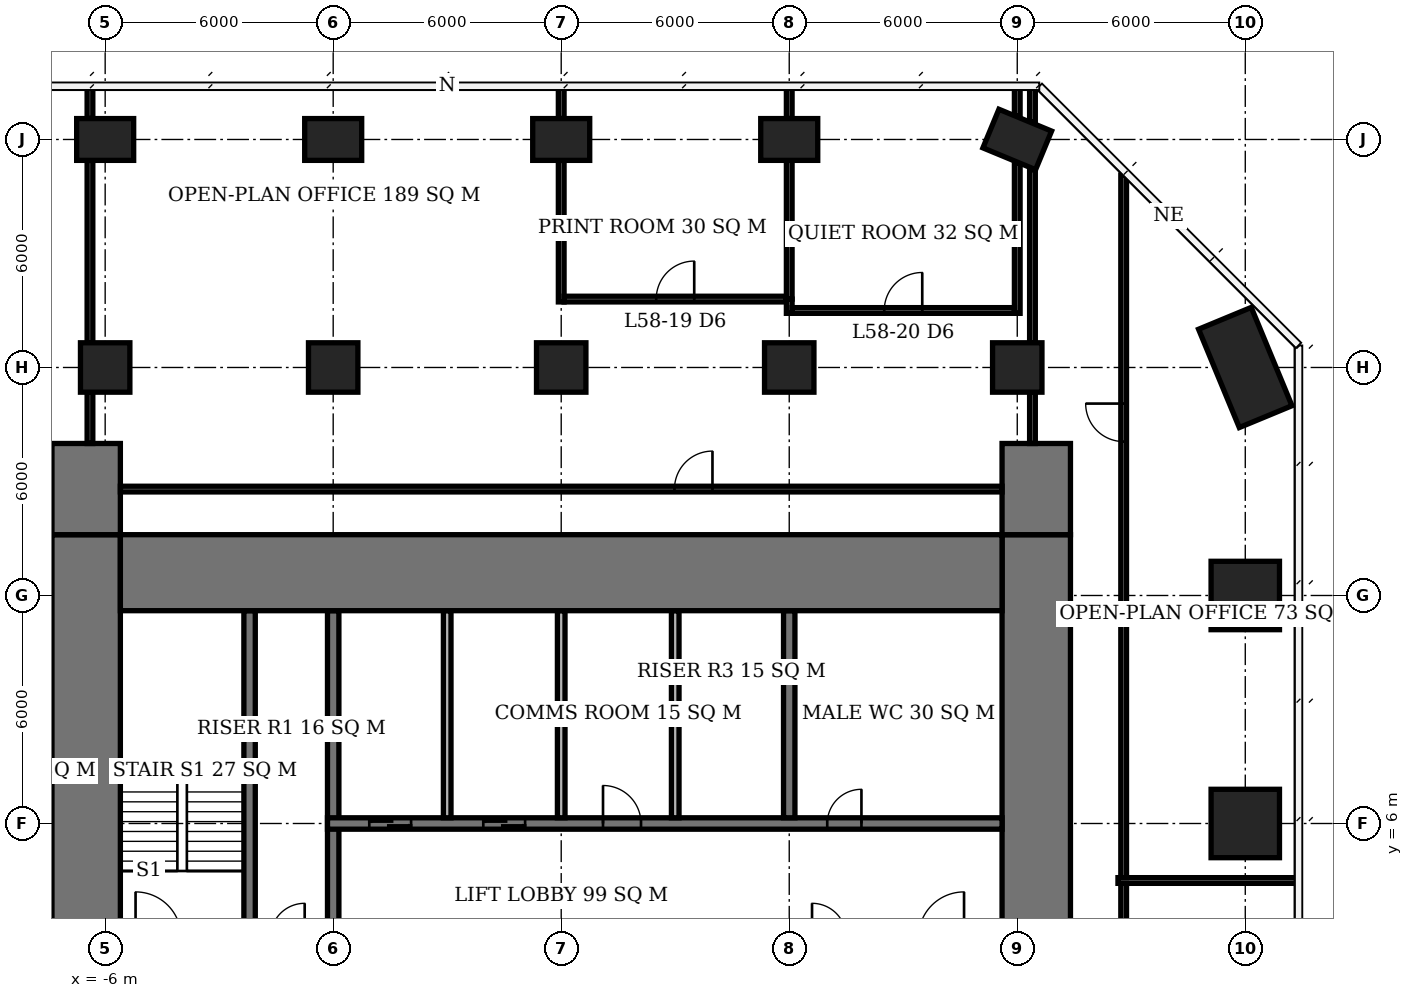
"""IFC4 building model, lengths in metres.
Left out: names, types, materials, properties, quantities, classifications, styles, units other than length and angle.
Written with IfcOpenShell. Run it as: python <this file> out.ifc"""

import sys

from ifc_helpers import new_model, si_unit, direction, frame, frame_2d, origin, origin_2d, place, context, subcontext, project, spatial, rectangle, extrude, element, fill, save


model = new_model("IFC4")
c1 = context("Model", 3, precision=1e-05, world=origin(), true_north=direction((0.0, 1.0)))
c2 = subcontext(c1, "Body", "Model", "MODEL_VIEW")
j1 = project(units=[si_unit("LENGTHUNIT", "METRE"), si_unit("PLANEANGLEUNIT", "RADIAN")], contexts=[c1])
p1 = place(None, origin())
s1 = spatial("IfcSite", under=j1, at=p1, CompositionType="ELEMENT")
p2 = place(p1, origin())
s2 = spatial("IfcBuilding", under=s1, at=p2, CompositionType="ELEMENT")
p3 = place(p2, frame((0.0, 0.0, 235.7)))
s3 = spatial("IfcBuildingStorey", under=s2, at=p3, CompositionType="ELEMENT", Elevation=235.7)
p4 = place(p3, frame((-6.0, 18.0, 0.0), z_axis=(0.0, 0.0, 1.0), x_axis=(1.0, 0.0, 0.0)))
e1 = element("IfcColumn", 1, at=p4, inside=s3, PredefinedType="COLUMN", context=c2, shape_type="SweptSolid", body=[
    extrude(rectangle(XDim=1.3, YDim=1.3, at=origin_2d()), origin(), (0.0, 0.0, 1.0), 3.9),
])
p5 = place(p3, frame((-6.0, 24.0, 0.0), z_axis=(0.0, 0.0, 1.0), x_axis=(1.0, 0.0, 0.0)))
e2 = element("IfcColumn", 2, at=p5, inside=s3, PredefinedType="COLUMN", context=c2, shape_type="SweptSolid", body=[
    extrude(rectangle(XDim=1.5, YDim=1.1, at=origin_2d()), origin(), (0.0, 0.0, 1.0), 3.9),
])
p6 = place(p3, frame((0.0, 18.0, 0.0), z_axis=(0.0, 0.0, 1.0), x_axis=(1.0, 0.0, 0.0)))
e3 = element("IfcColumn", 3, at=p6, inside=s3, PredefinedType="COLUMN", context=c2, shape_type="SweptSolid", body=[
    extrude(rectangle(XDim=1.3, YDim=1.3, at=origin_2d()), origin(), (0.0, 0.0, 1.0), 3.9),
])
p7 = place(p3, frame((0.0, 24.0, 0.0), z_axis=(0.0, 0.0, 1.0), x_axis=(1.0, 0.0, 0.0)))
e4 = element("IfcColumn", 4, at=p7, inside=s3, PredefinedType="COLUMN", context=c2, shape_type="SweptSolid", body=[
    extrude(rectangle(XDim=1.5, YDim=1.1, at=origin_2d()), origin(), (0.0, 0.0, 1.0), 3.9),
])
p8 = place(p3, frame((6.0, 18.0, 0.0), z_axis=(0.0, 0.0, 1.0), x_axis=(1.0, 0.0, 0.0)))
e5 = element("IfcColumn", 5, at=p8, inside=s3, PredefinedType="COLUMN", context=c2, shape_type="SweptSolid", body=[
    extrude(rectangle(XDim=1.3, YDim=1.3, at=origin_2d()), origin(), (0.0, 0.0, 1.0), 3.9),
])
p9 = place(p3, frame((6.0, 24.0, 0.0), z_axis=(0.0, 0.0, 1.0), x_axis=(1.0, 0.0, 0.0)))
e6 = element("IfcColumn", 6, at=p9, inside=s3, PredefinedType="COLUMN", context=c2, shape_type="SweptSolid", body=[
    extrude(rectangle(XDim=1.5, YDim=1.1, at=origin_2d()), origin(), (0.0, 0.0, 1.0), 3.9),
])
p10 = place(p3, frame((12.0, 18.0, 0.0), z_axis=(0.0, 0.0, 1.0), x_axis=(1.0, 0.0, 0.0)))
e7 = element("IfcColumn", 7, at=p10, inside=s3, PredefinedType="COLUMN", context=c2, shape_type="SweptSolid", body=[
    extrude(rectangle(XDim=1.3, YDim=1.3, at=origin_2d()), origin(), (0.0, 0.0, 1.0), 3.9),
])
p11 = place(p3, frame((12.0, 24.0, 0.0), z_axis=(0.0, 0.0, 1.0), x_axis=(1.0, 0.0, 0.0)))
e8 = element("IfcColumn", 8, at=p11, inside=s3, PredefinedType="COLUMN", context=c2, shape_type="SweptSolid", body=[
    extrude(rectangle(XDim=1.5, YDim=1.1, at=origin_2d()), origin(), (0.0, 0.0, 1.0), 3.9),
])
p12 = place(p3, frame((18.0, 18.0, 0.0), z_axis=(0.0, 0.0, 1.0), x_axis=(1.0, 0.0, 0.0)))
e9 = element("IfcColumn", 9, at=p12, inside=s3, PredefinedType="COLUMN", context=c2, shape_type="SweptSolid", body=[
    extrude(rectangle(XDim=1.3, YDim=1.3, at=origin_2d()), origin(), (0.0, 0.0, 1.0), 3.9),
])
p13 = place(p3, frame((18.0, 24.0, 0.0), z_axis=(0.0, 0.0, 1.0), x_axis=(0.923879532511, -0.382683432365, 0.0)))
e10 = element("IfcColumn", 10, at=p13, inside=s3, PredefinedType="COLUMN", context=c2, shape_type="SweptSolid", body=[
    extrude(rectangle(XDim=1.5, YDim=1.1, at=origin_2d()), origin(), (0.0, 0.0, 1.0), 3.9),
])
for number, where, z_axis, x_axis in (
    (11, (24.0, 6.0, 0.0), (0.0, 0.0, 1.0), (1.0, 0.0, 0.0)),
    (12, (24.0, 12.0, 0.0), (0.0, 0.0, 1.0), (1.0, 0.0, 0.0)),
):
    element("IfcColumn", number, at=place(p3, frame(where, z_axis=z_axis, x_axis=x_axis)), inside=s3, PredefinedType="COLUMN", context=c2, shape_type="SweptSolid", body=[
        extrude(rectangle(XDim=1.8, YDim=1.8, at=origin_2d()), origin(), (0.0, 0.0, 1.0), 3.9),
    ])
p14 = place(p3, frame((24.0, 18.0, 0.0), z_axis=(0.0, 0.0, 1.0), x_axis=(0.382683432365, -0.923879532511, 0.0)))
e13 = element("IfcColumn", 13, at=p14, inside=s3, PredefinedType="COLUMN", context=c2, shape_type="SweptSolid", body=[
    extrude(rectangle(XDim=2.8, YDim=1.5, at=origin_2d()), origin(), (0.0, 0.0, 1.0), 3.9),
])
p15 = place(p3, frame((-5.6, 12.6, 0.0), z_axis=(0.0, 0.0, 1.0), x_axis=(1.0, 0.0, 0.0)))
e14 = element("IfcWall", 14, at=p15, inside=s3, PredefinedType="SHEAR", context=c2, shape_type="SweptSolid", body=[
    extrude(rectangle(XDim=23.2, YDim=2.0, at=frame_2d((11.6, 0.0))), origin(), (0.0, 0.0, 1.0), 3.9),
])
p16 = place(p3, frame((-6.5, -7.6, 0.0), z_axis=(0.0, 0.0, 1.0), x_axis=(0.0, 1.0, 0.0)))
e15 = element("IfcWall", 15, at=p16, inside=s3, PredefinedType="SHEAR", context=c2, shape_type="SweptSolid", body=[
    extrude(rectangle(XDim=21.2, YDim=1.8, at=frame_2d((10.6, 0.0))), origin(), (0.0, 0.0, 1.0), 3.9),
])
p17 = place(p16, frame((7.8, 0.0, 0.0)))
e16 = element("IfcOpeningElement", 16, at=p17, cuts=e15, PredefinedType="OPENING", context=c2, shape_type="SweptSolid", body=[
    extrude(rectangle(XDim=1.8, YDim=2.4, at=frame_2d((0.9, 1.2))), frame((0.0, 0.91, 0.0), z_axis=(0.0, -1.0, 0.0), x_axis=(1.0, 0.0, 0.0)), (0.0, 0.0, 1.0), 1.82),
])
p18 = place(p3, frame((18.5, -7.6, 0.0), z_axis=(0.0, 0.0, 1.0), x_axis=(0.0, 1.0, 0.0)))
e17 = element("IfcWall", 17, at=p18, inside=s3, PredefinedType="SHEAR", context=c2, shape_type="SweptSolid", body=[
    extrude(rectangle(XDim=21.2, YDim=1.8, at=frame_2d((10.6, 0.0))), origin(), (0.0, 0.0, 1.0), 3.9),
])
p19 = place(p18, frame((9.2, 0.0, 0.0)))
e18 = element("IfcOpeningElement", 18, at=p19, cuts=e17, PredefinedType="OPENING", context=c2, shape_type="SweptSolid", body=[
    extrude(rectangle(XDim=1.8, YDim=2.4, at=frame_2d((0.9, 1.2))), frame((0.0, 0.91, 0.0), z_axis=(0.0, -1.0, 0.0), x_axis=(1.0, 0.0, 0.0)), (0.0, 0.0, 1.0), 1.82),
])
for number, where, z_axis, x_axis in (
    (19, (-6.5, 13.6, 0.0), (0.0, 0.0, 1.0), (0.0, 1.0, 0.0)),
    (20, (18.5, 13.6, 0.0), (0.0, 0.0, 1.0), (0.0, 1.0, 0.0)),
):
    element("IfcWall", number, at=place(p3, frame(where, z_axis=z_axis, x_axis=x_axis)), inside=s3, PredefinedType="SHEAR", context=c2, shape_type="SweptSolid", body=[
        extrude(rectangle(XDim=2.4, YDim=1.8, at=frame_2d((1.2, 0.0))), origin(), (0.0, 0.0, 1.0), 3.9),
    ])
p20 = place(p3, frame((-0.15, 6.0, 0.0), z_axis=(0.0, 0.0, 1.0), x_axis=(1.0, 0.0, 0.0)))
e21 = element("IfcWall", 21, at=p20, inside=s3, PredefinedType="SHEAR", context=c2, shape_type="SweptSolid", body=[
    extrude(rectangle(XDim=17.75, YDim=0.3, at=frame_2d((8.875, 0.0))), origin(), (0.0, 0.0, 1.0), 3.9),
])
p21 = place(p20, frame((13.15, 0.0, 0.0)))
e22 = element("IfcOpeningElement", 22, at=p21, cuts=e21, PredefinedType="OPENING", context=c2, shape_type="SweptSolid", body=[
    extrude(rectangle(XDim=0.9, YDim=2.1, at=frame_2d((0.45, 1.05))), frame((0.0, 0.16, 0.0), z_axis=(0.0, -1.0, 0.0), x_axis=(1.0, 0.0, 0.0)), (0.0, 0.0, 1.0), 0.32),
])
p22 = place(p20, frame((7.25, 0.0, 0.0)))
e23 = element("IfcOpeningElement", 23, at=p22, cuts=e21, PredefinedType="OPENING", context=c2, shape_type="SweptSolid", body=[
    extrude(rectangle(XDim=1.0, YDim=2.1, at=frame_2d((0.5, 1.05))), frame((0.0, 0.16, 0.0), z_axis=(0.0, -1.0, 0.0), x_axis=(1.0, 0.0, 0.0)), (0.0, 0.0, 1.0), 0.32),
])
p23 = place(p20, frame((1.1, 0.0, 0.0)))
e24 = element("IfcOpeningElement", 24, at=p23, cuts=e21, PredefinedType="OPENING", context=c2, shape_type="SweptSolid", body=[
    extrude(rectangle(XDim=1.1, YDim=2.1, at=frame_2d((0.55, 1.05))), frame((0.0, 0.16, 0.0), z_axis=(0.0, -1.0, 0.0), x_axis=(1.0, 0.0, 0.0)), (0.0, 0.0, 1.0), 0.32),
])
p24 = place(p20, frame((4.1, 0.0, 0.0)))
e25 = element("IfcOpeningElement", 25, at=p24, cuts=e21, PredefinedType="OPENING", context=c2, shape_type="SweptSolid", body=[
    extrude(rectangle(XDim=1.1, YDim=2.1, at=frame_2d((0.55, 1.05))), frame((0.0, 0.16, 0.0), z_axis=(0.0, -1.0, 0.0), x_axis=(1.0, 0.0, 0.0)), (0.0, 0.0, 1.0), 0.32),
])
p25 = place(p3, frame((0.0, 3.15, 0.0), z_axis=(0.0, 0.0, 1.0), x_axis=(0.0, 1.0, 0.0)))
e26 = element("IfcWall", 26, at=p25, inside=s3, PredefinedType="SHEAR", context=c2, shape_type="SweptSolid", body=[
    extrude(rectangle(XDim=8.45, YDim=0.3, at=frame_2d((4.225, 0.0))), origin(), (0.0, 0.0, 1.0), 3.9),
])
p26 = place(p3, frame((12.0, 6.15, 0.0), z_axis=(0.0, 0.0, 1.0), x_axis=(0.0, 1.0, 0.0)))
e27 = element("IfcWall", 27, at=p26, inside=s3, PredefinedType="SHEAR", context=c2, shape_type="SweptSolid", body=[
    extrude(rectangle(XDim=5.45, YDim=0.3, at=frame_2d((2.725, 0.0))), origin(), (0.0, 0.0, 1.0), 3.9),
])
p27 = place(p3, frame((-2.2, 3.15, 0.0), z_axis=(0.0, 0.0, 1.0), x_axis=(0.0, 1.0, 0.0)))
e28 = element("IfcWall", 28, at=p27, inside=s3, PredefinedType="SHEAR", context=c2, shape_type="SweptSolid", body=[
    extrude(rectangle(XDim=8.45, YDim=0.3, at=frame_2d((4.225, 0.0))), origin(), (0.0, 0.0, 1.0), 3.9),
])
for number, where, z_axis, x_axis in (
    (29, (3.0, 6.15, 0.0), (0.0, 0.0, 1.0), (0.0, 1.0, 0.0)),
    (30, (6.0, 6.15, 0.0), (0.0, 0.0, 1.0), (0.0, 1.0, 0.0)),
    (31, (9.0, 6.15, 0.0), (0.0, 0.0, 1.0), (0.0, 1.0, 0.0)),
):
    element("IfcWall", number, at=place(p3, frame(where, z_axis=z_axis, x_axis=x_axis)), inside=s3, PredefinedType="SOLIDWALL", context=c2, shape_type="SweptSolid", body=[
        extrude(rectangle(XDim=5.45, YDim=0.2, at=frame_2d((2.725, 0.0))), origin(), (0.0, 0.0, 1.0), 3.9),
    ])
p28 = place(p3, frame((12.075, 19.5, 0.0), z_axis=(0.0, 0.0, 1.0), x_axis=(1.0, 0.0, 0.0)))
e32 = element("IfcWall", 32, at=p28, inside=s3, PredefinedType="PARTITIONING", context=c2, shape_type="SweptSolid", body=[
    extrude(rectangle(XDim=5.85, YDim=0.15, at=frame_2d((2.925, 0.0))), origin(), (0.0, 0.0, 1.0), 3.65),
])
p29 = place(p28, frame((2.425, 0.0, 0.0)))
e33 = element("IfcOpeningElement", 33, at=p29, cuts=e32, PredefinedType="OPENING", context=c2, shape_type="SweptSolid", body=[
    extrude(rectangle(XDim=1.0, YDim=2.1, at=frame_2d((0.5, 1.05))), frame((0.0, 0.085, 0.0), z_axis=(0.0, -1.0, 0.0), x_axis=(1.0, 0.0, 0.0)), (0.0, 0.0, 1.0), 0.17),
])
p30 = place(p3, frame((6.075, 19.8, 0.0), z_axis=(0.0, 0.0, 1.0), x_axis=(1.0, 0.0, 0.0)))
e34 = element("IfcWall", 34, at=p30, inside=s3, PredefinedType="PARTITIONING", context=c2, shape_type="SweptSolid", body=[
    extrude(rectangle(XDim=5.85, YDim=0.15, at=frame_2d((2.925, 0.0))), origin(), (0.0, 0.0, 1.0), 3.65),
])
p31 = place(p30, frame((2.425, 0.0, 0.0)))
e35 = element("IfcOpeningElement", 35, at=p31, cuts=e34, PredefinedType="OPENING", context=c2, shape_type="SweptSolid", body=[
    extrude(rectangle(XDim=1.0, YDim=2.1, at=frame_2d((0.5, 1.05))), frame((0.0, 0.085, 0.0), z_axis=(0.0, -1.0, 0.0), x_axis=(1.0, 0.0, 0.0)), (0.0, 0.0, 1.0), 0.17),
])
p32 = place(p3, frame((6.0, 19.725, 0.0), z_axis=(0.0, 0.0, 1.0), x_axis=(0.0, 1.0, 0.0)))
e36 = element("IfcWall", 36, at=p32, inside=s3, PredefinedType="PARTITIONING", context=c2, shape_type="SweptSolid", body=[
    extrude(rectangle(XDim=3.725, YDim=0.15, at=frame_2d((1.862, 0.0))), origin(), (0.0, 0.0, 1.0), 3.65),
])
p33 = place(p3, frame((6.0, 24.55, 0.0), z_axis=(0.0, 0.0, 1.0), x_axis=(0.0, 1.0, 0.0)))
e37 = element("IfcWall", 37, at=p33, inside=s3, PredefinedType="PARTITIONING", context=c2, shape_type="SweptSolid", body=[
    extrude(rectangle(XDim=0.8, YDim=0.15, at=frame_2d((0.4, 0.0))), origin(), (0.0, 0.0, 1.0), 3.65),
])
p34 = place(p3, frame((12.0, 19.425, 0.0), z_axis=(0.0, 0.0, 1.0), x_axis=(0.0, 1.0, 0.0)))
e38 = element("IfcWall", 38, at=p34, inside=s3, PredefinedType="PARTITIONING", context=c2, shape_type="SweptSolid", body=[
    extrude(rectangle(XDim=0.375, YDim=0.15, at=frame_2d((0.188, 0.0))), origin(), (0.0, 0.0, 1.0), 3.65),
])
p35 = place(p3, frame((12.0, 19.8, 0.0), z_axis=(0.0, 0.0, 1.0), x_axis=(0.0, 1.0, 0.0)))
e39 = element("IfcWall", 39, at=p35, inside=s3, PredefinedType="PARTITIONING", context=c2, shape_type="SweptSolid", body=[
    extrude(rectangle(XDim=3.65, YDim=0.15, at=frame_2d((1.825, 0.0))), origin(), (0.0, 0.0, 1.0), 3.65),
])
p36 = place(p3, frame((12.0, 24.55, 0.0), z_axis=(0.0, 0.0, 1.0), x_axis=(0.0, 1.0, 0.0)))
e40 = element("IfcWall", 40, at=p36, inside=s3, PredefinedType="PARTITIONING", context=c2, shape_type="SweptSolid", body=[
    extrude(rectangle(XDim=0.85, YDim=0.15, at=frame_2d((0.425, 0.0))), origin(), (0.0, 0.0, 1.0), 3.65),
])
p37 = place(p3, frame((18.0, 19.425, 0.0), z_axis=(0.0, 0.0, 1.0), x_axis=(0.0, 1.0, 0.0)))
e41 = element("IfcWall", 41, at=p37, inside=s3, PredefinedType="PARTITIONING", context=c2, shape_type="SweptSolid", body=[
    extrude(rectangle(XDim=3.948, YDim=0.15, at=frame_2d((1.974, 0.0))), origin(), (0.0, 0.0, 1.0), 3.65),
])
p38 = place(p3, frame((18.0, 24.626, 0.0), z_axis=(0.0, 0.0, 1.0), x_axis=(0.0, 1.0, 0.0)))
e42 = element("IfcWall", 42, at=p38, inside=s3, PredefinedType="PARTITIONING", context=c2, shape_type="SweptSolid", body=[
    extrude(rectangle(XDim=0.773, YDim=0.15, at=frame_2d((0.387, 0.0))), origin(), (0.0, 0.0, 1.0), 3.65),
])
p39 = place(p3, frame((-6.4, 16.0, 0.0), z_axis=(0.0, 0.0, 1.0), x_axis=(0.0, 1.0, 0.0)))
e43 = element("IfcWall", 43, at=p39, inside=s3, PredefinedType="PARTITIONING", context=c2, shape_type="SweptSolid", body=[
    extrude(rectangle(XDim=1.35, YDim=0.15, at=frame_2d((0.675, 0.0))), origin(), (0.0, 0.0, 1.0), 3.65),
])
p40 = place(p3, frame((-6.4, 18.65, 0.0), z_axis=(0.0, 0.0, 1.0), x_axis=(0.0, 1.0, 0.0)))
e44 = element("IfcWall", 44, at=p40, inside=s3, PredefinedType="PARTITIONING", context=c2, shape_type="SweptSolid", body=[
    extrude(rectangle(XDim=4.8, YDim=0.15, at=frame_2d((2.4, 0.0))), origin(), (0.0, 0.0, 1.0), 3.65),
])
p41 = place(p3, frame((-6.4, 24.55, 0.0), z_axis=(0.0, 0.0, 1.0), x_axis=(0.0, 1.0, 0.0)))
e45 = element("IfcWall", 45, at=p41, inside=s3, PredefinedType="PARTITIONING", context=c2, shape_type="SweptSolid", body=[
    extrude(rectangle(XDim=0.8, YDim=0.15, at=frame_2d((0.4, 0.0))), origin(), (0.0, 0.0, 1.0), 3.65),
])
p42 = place(p3, frame((-5.6, 14.8, 0.0), z_axis=(0.0, 0.0, 1.0), x_axis=(1.0, 0.0, 0.0)))
e46 = element("IfcWall", 46, at=p42, inside=s3, PredefinedType="PARTITIONING", context=c2, shape_type="SweptSolid", body=[
    extrude(rectangle(XDim=23.2, YDim=0.15, at=frame_2d((11.6, 0.0))), origin(), (0.0, 0.0, 1.0), 3.65),
])
p43 = place(p42, frame((14.58, 0.0, 0.0)))
e47 = element("IfcOpeningElement", 47, at=p43, cuts=e46, PredefinedType="OPENING", context=c2, shape_type="SweptSolid", body=[
    extrude(rectangle(XDim=1.0, YDim=2.1, at=frame_2d((0.5, 1.05))), frame((0.0, 0.085, 0.0), z_axis=(0.0, -1.0, 0.0), x_axis=(1.0, 0.0, 0.0)), (0.0, 0.0, 1.0), 0.17),
])
p44 = place(p3, frame((18.4, 16.0, 0.0), z_axis=(0.0, 0.0, 1.0), x_axis=(0.0, 1.0, 0.0)))
e48 = element("IfcWall", 48, at=p44, inside=s3, PredefinedType="PARTITIONING", context=c2, shape_type="SweptSolid", body=[
    extrude(rectangle(XDim=1.35, YDim=0.15, at=frame_2d((0.675, 0.0))), origin(), (0.0, 0.0, 1.0), 3.65),
])
p45 = place(p3, frame((18.4, 18.65, 0.0), z_axis=(0.0, 0.0, 1.0), x_axis=(0.0, 1.0, 0.0)))
e49 = element("IfcWall", 49, at=p45, inside=s3, PredefinedType="PARTITIONING", context=c2, shape_type="SweptSolid", body=[
    extrude(rectangle(XDim=4.558, YDim=0.15, at=frame_2d((2.279, 0.0))), origin(), (0.0, 0.0, 1.0), 3.65),
])
p46 = place(p3, frame((18.4, 24.461, 0.0), z_axis=(0.0, 0.0, 1.0), x_axis=(0.0, 1.0, 0.0)))
e50 = element("IfcWall", 50, at=p46, inside=s3, PredefinedType="PARTITIONING", context=c2, shape_type="SweptSolid", body=[
    extrude(rectangle(XDim=0.939, YDim=0.15, at=frame_2d((0.47, 0.0))), origin(), (0.0, 0.0, 1.0), 3.65),
])
p47 = place(p3, frame((20.8, -13.008, 0.0), z_axis=(0.0, 0.0, 1.0), x_axis=(0.0, 1.0, 0.0)))
e51 = element("IfcWall", 51, at=p47, inside=s3, PredefinedType="PARTITIONING", context=c2, shape_type="SweptSolid", body=[
    extrude(rectangle(XDim=17.433, YDim=0.15, at=frame_2d((8.716, 0.0))), origin(), (0.0, 0.0, 1.0), 3.65),
])
p48 = place(p47, frame((9.469, 0.0, 0.0)))
e52 = element("IfcOpeningElement", 52, at=p48, cuts=e51, PredefinedType="OPENING", context=c2, shape_type="SweptSolid", body=[
    extrude(rectangle(XDim=1.0, YDim=2.1, at=frame_2d((0.5, 1.05))), frame((0.0, 0.085, 0.0), z_axis=(0.0, -1.0, 0.0), x_axis=(1.0, 0.0, 0.0)), (0.0, 0.0, 1.0), 0.17),
])
p49 = place(p3, frame((20.8, 4.575, 0.0), z_axis=(0.0, 0.0, 1.0), x_axis=(0.0, 1.0, 0.0)))
e53 = element("IfcWall", 53, at=p49, inside=s3, PredefinedType="PARTITIONING", context=c2, shape_type="SweptSolid", body=[
    extrude(rectangle(XDim=18.489, YDim=0.15, at=frame_2d((9.245, 0.0))), origin(), (0.0, 0.0, 1.0), 3.65),
])
p50 = place(p49, frame((11.475, 0.0, 0.0)))
e54 = element("IfcOpeningElement", 54, at=p50, cuts=e53, PredefinedType="OPENING", context=c2, shape_type="SweptSolid", body=[
    extrude(rectangle(XDim=1.0, YDim=2.1, at=frame_2d((0.5, 1.05))), frame((0.0, 0.085, 0.0), z_axis=(0.0, -1.0, 0.0), x_axis=(1.0, 0.0, 0.0)), (0.0, 0.0, 1.0), 0.17),
])
p51 = place(p3, frame((20.65, 4.5, 0.0), z_axis=(0.0, 0.0, 1.0), x_axis=(1.0, 0.0, 0.0)))
e55 = element("IfcWall", 55, at=p51, inside=s3, PredefinedType="PARTITIONING", context=c2, shape_type="SweptSolid", body=[
    extrude(rectangle(XDim=4.75, YDim=0.15, at=frame_2d((2.375, 0.0))), origin(), (0.0, 0.0, 1.0), 3.65),
])
p52 = place(p21, origin())
e56 = element("IfcDoor", 56, at=p52, inside=s3, OperationType="SINGLE_SWING_RIGHT", PredefinedType="DOOR", context=c2, shape_type="SweptSolid", body=[
    extrude(rectangle(XDim=0.9, YDim=2.1, at=frame_2d((0.45, 1.05))), frame((0.0, 0.025, 0.0), z_axis=(0.0, -1.0, 0.0), x_axis=(1.0, 0.0, 0.0)), (0.0, 0.0, 1.0), 0.05),
])
fill(e22, e56)
p53 = place(p22, origin())
e57 = element("IfcDoor", 57, at=p53, inside=s3, OperationType="SINGLE_SWING_LEFT", PredefinedType="DOOR", context=c2, shape_type="SweptSolid", body=[
    extrude(rectangle(XDim=1.0, YDim=2.1, at=frame_2d((0.5, 1.05))), frame((0.0, 0.025, 0.0), z_axis=(0.0, -1.0, 0.0), x_axis=(1.0, 0.0, 0.0)), (0.0, 0.0, 1.0), 0.05),
])
fill(e23, e57)
p54 = place(p23, origin())
e58 = element("IfcDoor", 58, at=p54, inside=s3, OperationType="DOUBLE_DOOR_SLIDING", PredefinedType="USERDEFINED", context=c2, shape_type="SweptSolid", body=[
    extrude(rectangle(XDim=1.1, YDim=2.1, at=frame_2d((0.55, 1.05))), frame((0.0, 0.025, 0.0), z_axis=(0.0, -1.0, 0.0), x_axis=(1.0, 0.0, 0.0)), (0.0, 0.0, 1.0), 0.05),
])
fill(e24, e58)
p55 = place(p24, origin())
e59 = element("IfcDoor", 59, at=p55, inside=s3, OperationType="DOUBLE_DOOR_SLIDING", PredefinedType="USERDEFINED", context=c2, shape_type="SweptSolid", body=[
    extrude(rectangle(XDim=1.1, YDim=2.1, at=frame_2d((0.55, 1.05))), frame((0.0, 0.025, 0.0), z_axis=(0.0, -1.0, 0.0), x_axis=(1.0, 0.0, 0.0)), (0.0, 0.0, 1.0), 0.05),
])
fill(e25, e59)
p56 = place(p31, origin())
e60 = element("IfcDoor", 60, at=p56, inside=s3, OperationType="SINGLE_SWING_RIGHT", PredefinedType="DOOR", context=c2, shape_type="SweptSolid", body=[
    extrude(rectangle(XDim=1.0, YDim=2.1, at=frame_2d((0.5, 1.05))), frame((0.0, 0.025, 0.0), z_axis=(0.0, -1.0, 0.0), x_axis=(1.0, 0.0, 0.0)), (0.0, 0.0, 1.0), 0.05),
])
fill(e35, e60)
p57 = place(p29, origin())
e61 = element("IfcDoor", 61, at=p57, inside=s3, OperationType="SINGLE_SWING_RIGHT", PredefinedType="DOOR", context=c2, shape_type="SweptSolid", body=[
    extrude(rectangle(XDim=1.0, YDim=2.1, at=frame_2d((0.5, 1.05))), frame((0.0, 0.025, 0.0), z_axis=(0.0, -1.0, 0.0), x_axis=(1.0, 0.0, 0.0)), (0.0, 0.0, 1.0), 0.05),
])
fill(e33, e61)
p58 = place(p50, origin())
e62 = element("IfcDoor", 62, at=p58, inside=s3, OperationType="SINGLE_SWING_RIGHT", PredefinedType="DOOR", context=c2, shape_type="SweptSolid", body=[
    extrude(rectangle(XDim=1.0, YDim=2.1, at=frame_2d((0.5, 1.05))), frame((0.0, 0.025, 0.0), z_axis=(0.0, -1.0, 0.0), x_axis=(1.0, 0.0, 0.0)), (0.0, 0.0, 1.0), 0.05),
])
fill(e54, e62)
p59 = place(p43, origin())
e63 = element("IfcDoor", 63, at=p59, inside=s3, OperationType="SINGLE_SWING_RIGHT", PredefinedType="DOOR", context=c2, shape_type="SweptSolid", body=[
    extrude(rectangle(XDim=1.0, YDim=2.1, at=frame_2d((0.5, 1.05))), frame((0.0, 0.025, 0.0), z_axis=(0.0, -1.0, 0.0), x_axis=(1.0, 0.0, 0.0)), (0.0, 0.0, 1.0), 0.05),
])
fill(e47, e63)
save(model, sys.argv[1])
